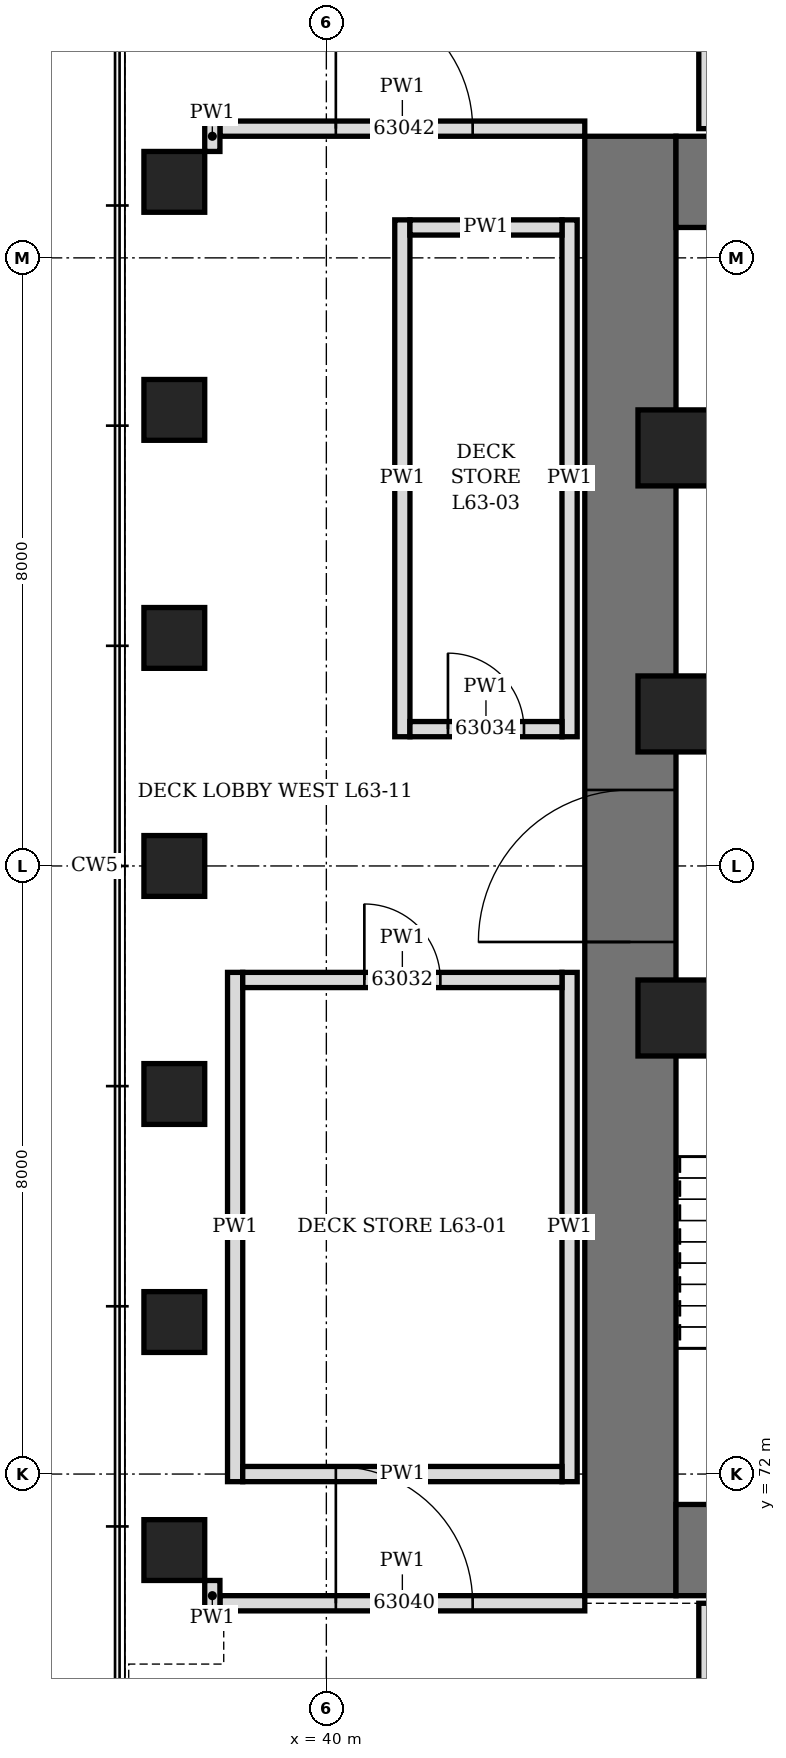
"""IFC4 building model, lengths in metres.
Left out: names, types, materials, properties, quantities, classifications, styles, units other than length and angle.
Written with IfcOpenShell. Run it as: python <this file> out.ifc"""

import sys

from ifc_helpers import new_model, si_unit, direction, frame, frame_2d, origin, origin_2d, place, context, subcontext, project, spatial, rectangle, hollow_rectangle, extrude, element, fill, save


model = new_model("IFC4")
c1 = context("Model", 3, precision=1e-05, world=origin(), true_north=direction((0.0, 1.0)))
c2 = subcontext(c1, "Body", "Model", "MODEL_VIEW")
j1 = project(units=[si_unit("LENGTHUNIT", "METRE"), si_unit("PLANEANGLEUNIT", "RADIAN")], contexts=[c1])
p1 = place(None, origin())
s1 = spatial("IfcSite", under=j1, at=p1, CompositionType="ELEMENT")
p2 = place(p1, origin())
s2 = spatial("IfcBuilding", under=s1, at=p2, CompositionType="ELEMENT")
p3 = place(p2, frame((0.0, 0.0, 279.7)))
s3 = spatial("IfcBuildingStorey", under=s2, at=p3, CompositionType="ELEMENT", Elevation=279.7)
for number, where, z_axis, x_axis in (
    (1, (38.0, 89.0, -0.25), (0.0, 0.0, 1.0), (0.0, 1.0, 0.0)),
    (2, (38.0, 86.0, -0.25), (0.0, 0.0, 1.0), (0.0, 1.0, 0.0)),
    (3, (38.0, 83.0, -0.25), (0.0, 0.0, 1.0), (0.0, 1.0, 0.0)),
    (4, (38.0, 80.0, -0.25), (0.0, 0.0, 1.0), (0.0, 1.0, 0.0)),
    (5, (38.0, 77.0, -0.25), (0.0, 0.0, 1.0), (0.0, 1.0, 0.0)),
    (6, (38.0, 74.0, -0.25), (0.0, 0.0, 1.0), (0.0, 1.0, 0.0)),
    (7, (38.0, 71.0, -0.25), (0.0, 0.0, 1.0), (0.0, 1.0, 0.0)),
):
    element("IfcColumn", number, at=place(p3, frame(where, z_axis=z_axis, x_axis=x_axis)), inside=s3, PredefinedType="COLUMN", context=c2, shape_type="SweptSolid", body=[
        extrude(hollow_rectangle(XDim=0.8, YDim=0.8, WallThickness=0.1, at=origin_2d()), origin(), (0.0, 0.0, 1.0), 6.25),
    ])
p4 = place(p3, frame((44.0, 70.4, 0.0), z_axis=(0.0, 0.0, 1.0), x_axis=(0.0, 1.0, 0.0)))
e8 = element("IfcWall", 8, at=p4, inside=s3, PredefinedType="SHEAR", context=c2, shape_type="SweptSolid", body=[
    extrude(rectangle(XDim=19.2, YDim=1.2, at=frame_2d((9.6, 0.0))), origin(), (0.0, 0.0, 1.0), 6.0),
])
p5 = place(p4, frame((8.6, 0.0, 0.0)))
e9 = element("IfcOpeningElement", 9, at=p5, cuts=e8, PredefinedType="OPENING", context=c2, shape_type="SweptSolid", body=[
    extrude(rectangle(XDim=2.0, YDim=2.4, at=frame_2d((1.0, 1.2))), frame((0.0, 0.61, 0.0), z_axis=(0.0, -1.0, 0.0), x_axis=(1.0, 0.0, 0.0)), (0.0, 0.0, 1.0), 1.22),
])
p6 = place(p3, frame((44.6, 71.0, 0.0), z_axis=(0.0, 0.0, 1.0), x_axis=(1.0, 0.0, 0.0)))
e10 = element("IfcWall", 10, at=p6, inside=s3, PredefinedType="SHEAR", context=c2, shape_type="SweptSolid", body=[
    extrude(rectangle(XDim=22.8, YDim=1.2, at=frame_2d((11.4, 0.0))), origin(), (0.0, 0.0, 1.0), 6.0),
])
p7 = place(p6, frame((6.35, 0.0, 0.0)))
e11 = element("IfcOpeningElement", 11, at=p7, cuts=e10, PredefinedType="OPENING", context=c2, shape_type="SweptSolid", body=[
    extrude(rectangle(XDim=1.1, YDim=2.2, at=frame_2d((0.55, 1.1))), frame((0.0, 0.61, 0.0), z_axis=(0.0, -1.0, 0.0), x_axis=(1.0, 0.0, 0.0)), (0.0, 0.0, 1.0), 1.22),
])
p8 = place(p6, frame((9.35, 0.0, 0.0)))
e12 = element("IfcOpeningElement", 12, at=p8, cuts=e10, PredefinedType="OPENING", context=c2, shape_type="SweptSolid", body=[
    extrude(rectangle(XDim=1.1, YDim=2.2, at=frame_2d((0.55, 1.1))), frame((0.0, 0.61, 0.0), z_axis=(0.0, -1.0, 0.0), x_axis=(1.0, 0.0, 0.0)), (0.0, 0.0, 1.0), 1.22),
])
p9 = place(p6, frame((12.35, 0.0, 0.0)))
e13 = element("IfcOpeningElement", 13, at=p9, cuts=e10, PredefinedType="OPENING", context=c2, shape_type="SweptSolid", body=[
    extrude(rectangle(XDim=1.1, YDim=2.2, at=frame_2d((0.55, 1.1))), frame((0.0, 0.61, 0.0), z_axis=(0.0, -1.0, 0.0), x_axis=(1.0, 0.0, 0.0)), (0.0, 0.0, 1.0), 1.22),
])
p10 = place(p6, frame((15.35, 0.0, 0.0)))
e14 = element("IfcOpeningElement", 14, at=p10, cuts=e10, PredefinedType="OPENING", context=c2, shape_type="SweptSolid", body=[
    extrude(rectangle(XDim=1.1, YDim=2.2, at=frame_2d((0.55, 1.1))), frame((0.0, 0.61, 0.0), z_axis=(0.0, -1.0, 0.0), x_axis=(1.0, 0.0, 0.0)), (0.0, 0.0, 1.0), 1.22),
])
p11 = place(p3, frame((44.6, 89.0, 0.0), z_axis=(0.0, 0.0, 1.0), x_axis=(1.0, 0.0, 0.0)))
e15 = element("IfcWall", 15, at=p11, inside=s3, PredefinedType="SHEAR", context=c2, shape_type="SweptSolid", body=[
    extrude(rectangle(XDim=22.8, YDim=1.2, at=frame_2d((11.4, 0.0))), origin(), (0.0, 0.0, 1.0), 6.0),
])
p12 = place(p11, frame((7.9, 0.0, 0.0)))
e16 = element("IfcOpeningElement", 16, at=p12, cuts=e15, PredefinedType="OPENING", context=c2, shape_type="SweptSolid", body=[
    extrude(rectangle(XDim=1.0, YDim=2.1, at=frame_2d((0.5, 1.05))), frame((0.0, 0.61, 0.0), z_axis=(0.0, -1.0, 0.0), x_axis=(1.0, 0.0, 0.0)), (0.0, 0.0, 1.0), 1.22),
])
p13 = place(p11, frame((12.025, 0.0, 0.0)))
e17 = element("IfcOpeningElement", 17, at=p13, cuts=e15, PredefinedType="OPENING", context=c2, shape_type="SweptSolid", body=[
    extrude(rectangle(XDim=0.9, YDim=2.1, at=frame_2d((0.45, 1.05))), frame((0.0, 0.61, 0.0), z_axis=(0.0, -1.0, 0.0), x_axis=(1.0, 0.0, 0.0)), (0.0, 0.0, 1.0), 1.22),
])
p14 = place(p11, frame((13.962, 0.0, 0.0)))
e18 = element("IfcOpeningElement", 18, at=p14, cuts=e15, PredefinedType="OPENING", context=c2, shape_type="SweptSolid", body=[
    extrude(rectangle(XDim=0.9, YDim=2.1, at=frame_2d((0.45, 1.05))), frame((0.0, 0.61, 0.0), z_axis=(0.0, -1.0, 0.0), x_axis=(1.0, 0.0, 0.0)), (0.0, 0.0, 1.0), 1.22),
])
p15 = place(p3, frame((44.6, 78.0, 0.0), z_axis=(0.0, 0.0, 1.0), x_axis=(1.0, 0.0, 0.0)))
e19 = element("IfcWall", 19, at=p15, inside=s3, PredefinedType="SHEAR", context=c2, shape_type="SweptSolid", body=[
    extrude(rectangle(XDim=5.175, YDim=0.45, at=frame_2d((2.587, 0.0))), origin(), (0.0, 0.0, 1.0), 6.0),
])
p16 = place(p15, frame((1.8, 0.0, 0.0)))
e20 = element("IfcOpeningElement", 20, at=p16, cuts=e19, PredefinedType="OPENING", context=c2, shape_type="SweptSolid", body=[
    extrude(rectangle(XDim=1.2, YDim=2.1, at=frame_2d((0.6, 1.05))), frame((0.0, 0.235, 0.0), z_axis=(0.0, -1.0, 0.0), x_axis=(1.0, 0.0, 0.0)), (0.0, 0.0, 1.0), 0.47),
])
p17 = place(p3, frame((44.6, 82.0, 0.0), z_axis=(0.0, 0.0, 1.0), x_axis=(1.0, 0.0, 0.0)))
e21 = element("IfcWall", 21, at=p17, inside=s3, PredefinedType="SHEAR", context=c2, shape_type="SweptSolid", body=[
    extrude(rectangle(XDim=5.175, YDim=0.45, at=frame_2d((2.587, 0.0))), origin(), (0.0, 0.0, 1.0), 6.0),
])
p18 = place(p17, frame((0.7, 0.0, 0.0)))
e22 = element("IfcOpeningElement", 22, at=p18, cuts=e21, PredefinedType="OPENING", context=c2, shape_type="SweptSolid", body=[
    extrude(rectangle(XDim=0.9, YDim=2.1, at=frame_2d((0.45, 1.05))), frame((0.0, 0.235, 0.0), z_axis=(0.0, -1.0, 0.0), x_axis=(1.0, 0.0, 0.0)), (0.0, 0.0, 1.0), 0.47),
])
p19 = place(p3, frame((44.6, 85.5, 0.0), z_axis=(0.0, 0.0, 1.0), x_axis=(1.0, 0.0, 0.0)))
e23 = element("IfcWall", 23, at=p19, inside=s3, PredefinedType="SHEAR", context=c2, shape_type="SweptSolid", body=[
    extrude(rectangle(XDim=5.175, YDim=0.45, at=frame_2d((2.587, 0.0))), origin(), (0.0, 0.0, 1.0), 6.0),
])
p20 = place(p19, frame((0.7, 0.0, 0.0)))
e24 = element("IfcOpeningElement", 24, at=p20, cuts=e23, PredefinedType="OPENING", context=c2, shape_type="SweptSolid", body=[
    extrude(rectangle(XDim=0.9, YDim=2.1, at=frame_2d((0.45, 1.05))), frame((0.0, 0.235, 0.0), z_axis=(0.0, -1.0, 0.0), x_axis=(1.0, 0.0, 0.0)), (0.0, 0.0, 1.0), 0.47),
])
for number, where, z_axis, x_axis in (
    (25, (44.6, 78.0, 0.0), (0.0, 0.0, 1.0), (1.0, 0.0, 0.0)),
    (26, (44.6, 82.0, 0.0), (0.0, 0.0, 1.0), (1.0, 0.0, 0.0)),
    (27, (44.6, 85.5, 0.0), (0.0, 0.0, 1.0), (1.0, 0.0, 0.0)),
):
    element("IfcColumn", number, at=place(p3, frame(where, z_axis=z_axis, x_axis=x_axis)), inside=s3, PredefinedType="COLUMN", context=c2, shape_type="SweptSolid", body=[
        extrude(hollow_rectangle(XDim=1.0, YDim=1.0, WallThickness=0.15, at=origin_2d()), origin(), (0.0, 0.0, 1.0), 6.0),
    ])
for number, where, z_axis, x_axis in (
    (28, (38.8, 71.9, 0.0), (0.0, 0.0, 1.0), (0.0, 1.0, 0.0)),
    (29, (43.2, 71.9, 0.0), (0.0, 0.0, 1.0), (0.0, 1.0, 0.0)),
):
    element("IfcWall", number, at=place(p3, frame(where, z_axis=z_axis, x_axis=x_axis)), inside=s3, PredefinedType="PARTITIONING", context=c2, shape_type="SweptSolid", body=[
        extrude(rectangle(XDim=6.7, YDim=0.2, at=frame_2d((3.35, 0.0))), origin(), (0.0, 0.0, 1.0), 5.75),
    ])
p21 = place(p3, frame((38.9, 72.0, 0.0), z_axis=(0.0, 0.0, 1.0), x_axis=(1.0, 0.0, 0.0)))
e30 = element("IfcWall", 30, at=p21, inside=s3, PredefinedType="PARTITIONING", context=c2, shape_type="SweptSolid", body=[
    extrude(rectangle(XDim=4.2, YDim=0.2, at=frame_2d((2.1, 0.0))), origin(), (0.0, 0.0, 1.0), 5.75),
])
p22 = place(p3, frame((38.9, 78.5, 0.0), z_axis=(0.0, 0.0, 1.0), x_axis=(1.0, 0.0, 0.0)))
e31 = element("IfcWall", 31, at=p22, inside=s3, PredefinedType="PARTITIONING", context=c2, shape_type="SweptSolid", body=[
    extrude(rectangle(XDim=4.2, YDim=0.2, at=frame_2d((2.1, 0.0))), origin(), (0.0, 0.0, 1.0), 5.75),
])
p23 = place(p22, frame((1.6, 0.0, 0.0)))
e32 = element("IfcOpeningElement", 32, at=p23, cuts=e31, PredefinedType="OPENING", context=c2, shape_type="SweptSolid", body=[
    extrude(rectangle(XDim=1.0, YDim=2.1, at=frame_2d((0.5, 1.05))), frame((0.0, 0.11, 0.0), z_axis=(0.0, -1.0, 0.0), x_axis=(1.0, 0.0, 0.0)), (0.0, 0.0, 1.0), 0.22),
])
for number, where, z_axis, x_axis in (
    (33, (41.0, 81.7, 0.0), (0.0, 0.0, 1.0), (0.0, 1.0, 0.0)),
    (34, (43.2, 81.7, 0.0), (0.0, 0.0, 1.0), (0.0, 1.0, 0.0)),
):
    element("IfcWall", number, at=place(p3, frame(where, z_axis=z_axis, x_axis=x_axis)), inside=s3, PredefinedType="PARTITIONING", context=c2, shape_type="SweptSolid", body=[
        extrude(rectangle(XDim=6.8, YDim=0.2, at=frame_2d((3.4, 0.0))), origin(), (0.0, 0.0, 1.0), 5.75),
    ])
p24 = place(p3, frame((41.1, 81.8, 0.0), z_axis=(0.0, 0.0, 1.0), x_axis=(1.0, 0.0, 0.0)))
e35 = element("IfcWall", 35, at=p24, inside=s3, PredefinedType="PARTITIONING", context=c2, shape_type="SweptSolid", body=[
    extrude(rectangle(XDim=2.0, YDim=0.2, at=frame_2d((1.0, 0.0))), origin(), (0.0, 0.0, 1.0), 5.75),
])
p25 = place(p24, frame((0.5, 0.0, 0.0)))
e36 = element("IfcOpeningElement", 36, at=p25, cuts=e35, PredefinedType="OPENING", context=c2, shape_type="SweptSolid", body=[
    extrude(rectangle(XDim=1.0, YDim=2.1, at=frame_2d((0.5, 1.05))), frame((0.0, 0.11, 0.0), z_axis=(0.0, -1.0, 0.0), x_axis=(1.0, 0.0, 0.0)), (0.0, 0.0, 1.0), 0.22),
])
p26 = place(p3, frame((41.1, 88.4, 0.0), z_axis=(0.0, 0.0, 1.0), x_axis=(1.0, 0.0, 0.0)))
e37 = element("IfcWall", 37, at=p26, inside=s3, PredefinedType="PARTITIONING", context=c2, shape_type="SweptSolid", body=[
    extrude(rectangle(XDim=2.0, YDim=0.2, at=frame_2d((1.0, 0.0))), origin(), (0.0, 0.0, 1.0), 5.75),
])
for number, where, z_axis, x_axis in (
    (38, (45.0, 89.7, 0.0), (0.0, 0.0, 1.0), (0.0, 1.0, 0.0)),
    (39, (45.0, 64.7, 0.0), (0.0, 0.0, 1.0), (0.0, 1.0, 0.0)),
):
    element("IfcWall", number, at=place(p3, frame(where, z_axis=z_axis, x_axis=x_axis)), inside=s3, PredefinedType="PARTITIONING", context=c2, shape_type="SweptSolid", body=[
        extrude(rectangle(XDim=5.6, YDim=0.2, at=frame_2d((2.8, 0.0))), origin(), (0.0, 0.0, 1.0), 5.75),
    ])
p27 = place(p3, frame((38.6, 70.3, 0.0), z_axis=(0.0, 0.0, 1.0), x_axis=(1.0, 0.0, 0.0)))
e40 = element("IfcWall", 40, at=p27, inside=s3, PredefinedType="PARTITIONING", context=c2, shape_type="SweptSolid", body=[
    extrude(rectangle(XDim=4.8, YDim=0.2, at=frame_2d((2.4, 0.0))), origin(), (0.0, 0.0, 1.0), 5.75),
])
p28 = place(p27, frame((1.525, 0.0, 0.0)))
e41 = element("IfcOpeningElement", 41, at=p28, cuts=e40, PredefinedType="OPENING", context=c2, shape_type="SweptSolid", body=[
    extrude(rectangle(XDim=1.8, YDim=2.4, at=frame_2d((0.9, 1.2))), frame((0.0, 0.11, 0.0), z_axis=(0.0, -1.0, 0.0), x_axis=(1.0, 0.0, 0.0)), (0.0, 0.0, 1.0), 0.22),
])
p29 = place(p3, frame((38.5, 70.2, 0.0), z_axis=(0.0, 0.0, 1.0), x_axis=(0.0, 1.0, 0.0)))
e42 = element("IfcWall", 42, at=p29, inside=s3, PredefinedType="PARTITIONING", context=c2, shape_type="SweptSolid", body=[
    extrude(rectangle(XDim=0.4, YDim=0.2, at=frame_2d((0.2, 0.0))), origin(), (0.0, 0.0, 1.0), 5.75),
])
p30 = place(p3, frame((38.6, 89.7, 0.0), z_axis=(0.0, 0.0, 1.0), x_axis=(1.0, 0.0, 0.0)))
e43 = element("IfcWall", 43, at=p30, inside=s3, PredefinedType="PARTITIONING", context=c2, shape_type="SweptSolid", body=[
    extrude(rectangle(XDim=4.8, YDim=0.2, at=frame_2d((2.4, 0.0))), origin(), (0.0, 0.0, 1.0), 5.75),
])
p31 = place(p30, frame((1.525, 0.0, 0.0)))
e44 = element("IfcOpeningElement", 44, at=p31, cuts=e43, PredefinedType="OPENING", context=c2, shape_type="SweptSolid", body=[
    extrude(rectangle(XDim=1.8, YDim=2.4, at=frame_2d((0.9, 1.2))), frame((0.0, 0.11, 0.0), z_axis=(0.0, -1.0, 0.0), x_axis=(1.0, 0.0, 0.0)), (0.0, 0.0, 1.0), 0.22),
])
p32 = place(p3, frame((38.5, 89.8, 0.0), z_axis=(0.0, 0.0, 1.0), x_axis=(0.0, -1.0, 0.0)))
e45 = element("IfcWall", 45, at=p32, inside=s3, PredefinedType="PARTITIONING", context=c2, shape_type="SweptSolid", body=[
    extrude(rectangle(XDim=0.4, YDim=0.2, at=frame_2d((0.2, 0.0))), origin(), (0.0, 0.0, 1.0), 5.75),
])
p33 = place(p5, origin())
e46 = element("IfcDoor", 46, at=p33, inside=s3, OperationType="DOUBLE_DOOR_SINGLE_SWING", PredefinedType="DOOR", context=c2, shape_type="SweptSolid", body=[
    extrude(rectangle(XDim=2.0, YDim=2.4, at=frame_2d((1.0, 1.2))), frame((0.0, 0.35, 0.0), z_axis=(0.0, -1.0, 0.0), x_axis=(1.0, 0.0, 0.0)), (0.0, 0.0, 1.0), 0.7),
])
fill(e9, e46)
p34 = place(p23, origin())
e47 = element("IfcDoor", 47, at=p34, inside=s3, OperationType="SINGLE_SWING_LEFT", PredefinedType="DOOR", context=c2, shape_type="SweptSolid", body=[
    extrude(rectangle(XDim=1.0, YDim=2.1, at=frame_2d((0.5, 1.05))), frame((0.0, 0.1, 0.0), z_axis=(0.0, -1.0, 0.0), x_axis=(1.0, 0.0, 0.0)), (0.0, 0.0, 1.0), 0.199),
])
fill(e32, e47)
p35 = place(p25, origin())
e48 = element("IfcDoor", 48, at=p35, inside=s3, OperationType="SINGLE_SWING_LEFT", PredefinedType="DOOR", context=c2, shape_type="SweptSolid", body=[
    extrude(rectangle(XDim=1.0, YDim=2.1, at=frame_2d((0.5, 1.05))), frame((0.0, 0.1, 0.0), z_axis=(0.0, -1.0, 0.0), x_axis=(1.0, 0.0, 0.0)), (0.0, 0.0, 1.0), 0.199),
])
fill(e36, e48)
p36 = place(p28, origin())
e49 = element("IfcDoor", 49, at=p36, inside=s3, OperationType="DOUBLE_DOOR_DOUBLE_SWING", PredefinedType="DOOR", context=c2, shape_type="SweptSolid", body=[
    extrude(rectangle(XDim=1.8, YDim=2.4, at=frame_2d((0.9, 1.2))), frame((0.0, 0.1, 0.0), z_axis=(0.0, -1.0, 0.0), x_axis=(1.0, 0.0, 0.0)), (0.0, 0.0, 1.0), 0.199),
])
fill(e41, e49)
p37 = place(p31, origin())
e50 = element("IfcDoor", 50, at=p37, inside=s3, OperationType="DOUBLE_DOOR_DOUBLE_SWING", PredefinedType="DOOR", context=c2, shape_type="SweptSolid", body=[
    extrude(rectangle(XDim=1.8, YDim=2.4, at=frame_2d((0.9, 1.2))), frame((0.0, 0.1, 0.0), z_axis=(0.0, -1.0, 0.0), x_axis=(1.0, 0.0, 0.0)), (0.0, 0.0, 1.0), 0.199),
])
fill(e44, e50)
save(model, sys.argv[1])
